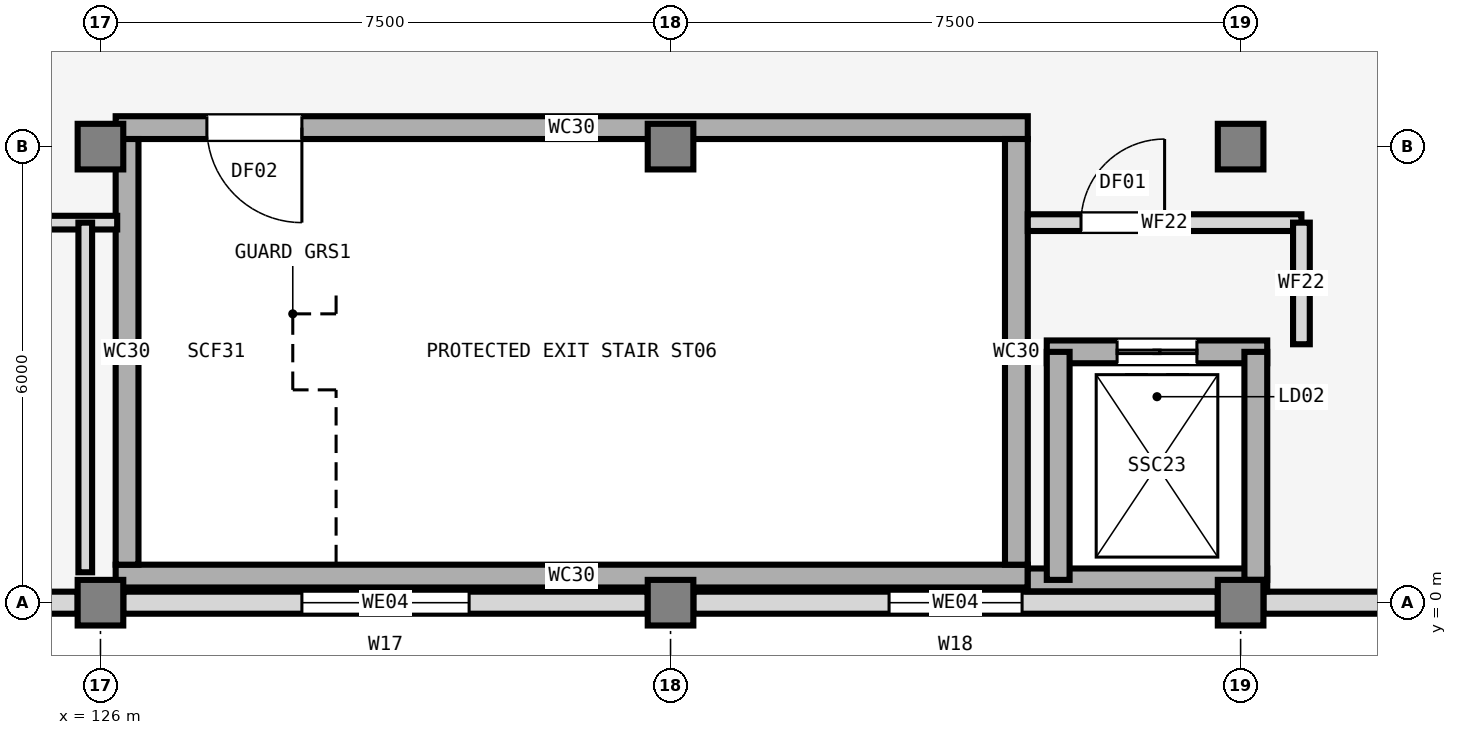
"""IFC4 building model, lengths in metres.
Left out: names, types, materials, properties, quantities, classifications, styles, units other than length and angle.
Written with IfcOpenShell. Run it as: python <this file> out.ifc"""

import sys

from ifc_helpers import new_model, si_unit, direction, frame, frame_2d, origin, origin_2d, place, context, subcontext, project, spatial, rectangle, extrude, element, fill, save


model = new_model("IFC4")
c1 = context("Model", 3, precision=1e-05, world=origin(), true_north=direction((0.0, 1.0)))
c2 = subcontext(c1, "Body", "Model", "MODEL_VIEW")
j1 = project(units=[si_unit("LENGTHUNIT", "METRE"), si_unit("PLANEANGLEUNIT", "RADIAN")], contexts=[c1])
p1 = place(None, origin())
s1 = spatial("IfcSite", under=j1, at=p1, CompositionType="ELEMENT")
p2 = place(p1, origin())
s2 = spatial("IfcBuilding", under=s1, at=p2, CompositionType="ELEMENT")
p3 = place(p2, frame((0.0, 0.0, 4.8)))
s3 = spatial("IfcBuildingStorey", under=s2, at=p3, CompositionType="ELEMENT", Elevation=4.8)
for number, where, z_axis, x_axis in (
    (1, (126.0, 0.0, 0.0), (0.0, 0.0, 1.0), (1.0, 0.0, 0.0)),
    (2, (126.0, 6.0, 0.0), (0.0, 0.0, 1.0), (1.0, 0.0, 0.0)),
    (3, (133.5, 0.0, 0.0), (0.0, 0.0, 1.0), (1.0, 0.0, 0.0)),
    (4, (133.5, 6.0, 0.0), (0.0, 0.0, 1.0), (1.0, 0.0, 0.0)),
    (5, (141.0, 0.0, 0.0), (0.0, 0.0, 1.0), (1.0, 0.0, 0.0)),
    (6, (141.0, 6.0, 0.0), (0.0, 0.0, 1.0), (1.0, 0.0, 0.0)),
):
    element("IfcColumn", number, at=place(p3, frame(where, z_axis=z_axis, x_axis=x_axis)), inside=s3, PredefinedType="COLUMN", context=c2, shape_type="SweptSolid", body=[
        extrude(rectangle(XDim=0.6, YDim=0.6, at=origin_2d()), origin(), (0.0, 0.0, 1.0), 4.5),
    ])
p4 = place(p3, frame((118.8, 0.0, 0.0), z_axis=(0.0, 0.0, 1.0), x_axis=(1.0, 0.0, 0.0)))
e7 = element("IfcWall", 7, at=p4, inside=s3, PredefinedType="SOLIDWALL", context=c2, shape_type="SweptSolid", body=[
    extrude(rectangle(XDim=6.9, YDim=0.29, at=frame_2d((3.45, 0.0))), origin(), (0.0, 0.0, 1.0), 3.7),
])
p5 = place(p4, frame((2.8, 0.0, 2.05)))
e8 = element("IfcOpeningElement", 8, at=p5, cuts=e7, PredefinedType="OPENING", context=c2, shape_type="SweptSolid", body=[
    extrude(rectangle(XDim=1.3, YDim=0.85, at=frame_2d((0.65, 0.425))), frame((0.0, 0.155, 0.0), z_axis=(0.0, -1.0, 0.0), x_axis=(1.0, 0.0, 0.0)), (0.0, 0.0, 1.0), 0.31),
])
p6 = place(p3, frame((126.3, 0.0, 0.0), z_axis=(0.0, 0.0, 1.0), x_axis=(1.0, 0.0, 0.0)))
e9 = element("IfcWall", 9, at=p6, inside=s3, PredefinedType="SOLIDWALL", context=c2, shape_type="SweptSolid", body=[
    extrude(rectangle(XDim=6.9, YDim=0.29, at=frame_2d((3.45, 0.0))), origin(), (0.0, 0.0, 1.0), 3.7),
])
p7 = place(p6, frame((2.35, 0.0, 2.05)))
e10 = element("IfcOpeningElement", 10, at=p7, cuts=e9, PredefinedType="OPENING", context=c2, shape_type="SweptSolid", body=[
    extrude(rectangle(XDim=2.2, YDim=0.95, at=frame_2d((1.1, 0.475))), frame((0.0, 0.155, 0.0), z_axis=(0.0, -1.0, 0.0), x_axis=(1.0, 0.0, 0.0)), (0.0, 0.0, 1.0), 0.31),
])
p8 = place(p3, frame((133.8, 0.0, 0.0), z_axis=(0.0, 0.0, 1.0), x_axis=(1.0, 0.0, 0.0)))
e11 = element("IfcWall", 11, at=p8, inside=s3, PredefinedType="SOLIDWALL", context=c2, shape_type="SweptSolid", body=[
    extrude(rectangle(XDim=6.9, YDim=0.29, at=frame_2d((3.45, 0.0))), origin(), (0.0, 0.0, 1.0), 3.7),
])
p9 = place(p8, frame((2.575, 0.0, 2.05)))
e12 = element("IfcOpeningElement", 12, at=p9, cuts=e11, PredefinedType="OPENING", context=c2, shape_type="SweptSolid", body=[
    extrude(rectangle(XDim=1.75, YDim=0.9, at=frame_2d((0.875, 0.45))), frame((0.0, 0.155, 0.0), z_axis=(0.0, -1.0, 0.0), x_axis=(1.0, 0.0, 0.0)), (0.0, 0.0, 1.0), 0.31),
])
p10 = place(p3, frame((141.3, 0.0, 0.0), z_axis=(0.0, 0.0, 1.0), x_axis=(1.0, 0.0, 0.0)))
e13 = element("IfcWall", 13, at=p10, inside=s3, PredefinedType="SOLIDWALL", context=c2, shape_type="SweptSolid", body=[
    extrude(rectangle(XDim=8.4, YDim=0.29, at=frame_2d((4.2, 0.0))), origin(), (0.0, 0.0, 1.0), 3.7),
])
p11 = place(p10, frame((3.55, 0.0, 2.05)))
e14 = element("IfcOpeningElement", 14, at=p11, cuts=e13, PredefinedType="OPENING", context=c2, shape_type="SweptSolid", body=[
    extrude(rectangle(XDim=1.3, YDim=0.85, at=frame_2d((0.65, 0.425))), frame((0.0, 0.155, 0.0), z_axis=(0.0, -1.0, 0.0), x_axis=(1.0, 0.0, 0.0)), (0.0, 0.0, 1.0), 0.31),
])
p12 = place(p3, frame((138.2, 0.35, 0.0), z_axis=(0.0, 0.0, 1.0), x_axis=(-1.0, 0.0, 0.0)))
e15 = element("IfcWall", 15, at=p12, inside=s3, PredefinedType="SHEAR", context=c2, shape_type="SweptSolid", body=[
    extrude(rectangle(XDim=12.0, YDim=0.3, at=frame_2d((6.0, 0.0))), origin(), (0.0, 0.0, 1.0), 4.5),
])
p13 = place(p3, frame((138.2, 6.25, 0.0), z_axis=(0.0, 0.0, 1.0), x_axis=(-1.0, 0.0, 0.0)))
e16 = element("IfcWall", 16, at=p13, inside=s3, PredefinedType="SHEAR", context=c2, shape_type="SweptSolid", body=[
    extrude(rectangle(XDim=12.0, YDim=0.3, at=frame_2d((6.0, 0.0))), origin(), (0.0, 0.0, 1.0), 4.5),
])
p14 = place(p13, frame((9.55, 0.0, 0.0)))
e17 = element("IfcOpeningElement", 17, at=p14, cuts=e16, PredefinedType="OPENING", context=c2, shape_type="SweptSolid", body=[
    extrude(rectangle(XDim=1.25, YDim=2.15, at=frame_2d((0.625, 1.075))), frame((0.0, 0.16, 0.0), z_axis=(0.0, -1.0, 0.0), x_axis=(1.0, 0.0, 0.0)), (0.0, 0.0, 1.0), 0.32),
])
for number, where, z_axis, x_axis in (
    (18, (126.35, 6.1, 0.0), (0.0, 0.0, 1.0), (0.0, -1.0, 0.0)),
    (19, (138.05, 0.5, 0.0), (0.0, 0.0, 1.0), (0.0, 1.0, 0.0)),
):
    element("IfcWall", number, at=place(p3, frame(where, z_axis=z_axis, x_axis=x_axis)), inside=s3, PredefinedType="SHEAR", context=c2, shape_type="SweptSolid", body=[
        extrude(rectangle(XDim=5.6, YDim=0.3, at=frame_2d((2.8, 0.0))), origin(), (0.0, 0.0, 1.0), 4.5),
    ])
p15 = place(p3, frame((138.2, 0.3, 0.0), z_axis=(0.0, 0.0, 1.0), x_axis=(1.0, 0.0, 0.0)))
e20 = element("IfcWall", 20, at=p15, inside=s3, PredefinedType="SHEAR", context=c2, shape_type="SweptSolid", body=[
    extrude(rectangle(XDim=3.15, YDim=0.3, at=frame_2d((1.575, 0.0))), origin(), (0.0, 0.0, 1.0), 4.5),
])
p16 = place(p3, frame((141.35, 3.3, 0.0), z_axis=(0.0, 0.0, 1.0), x_axis=(-1.0, 0.0, 0.0)))
e21 = element("IfcWall", 21, at=p16, inside=s3, PredefinedType="SHEAR", context=c2, shape_type="SweptSolid", body=[
    extrude(rectangle(XDim=2.9, YDim=0.3, at=frame_2d((1.45, 0.0))), origin(), (0.0, 0.0, 1.0), 4.5),
])
p17 = place(p16, frame((0.925, 0.0, 0.0)))
e22 = element("IfcOpeningElement", 22, at=p17, cuts=e21, PredefinedType="OPENING", context=c2, shape_type="SweptSolid", body=[
    extrude(rectangle(XDim=1.05, YDim=2.15, at=frame_2d((0.525, 1.075))), frame((0.0, 0.16, 0.0), z_axis=(0.0, -1.0, 0.0), x_axis=(1.0, 0.0, 0.0)), (0.0, 0.0, 1.0), 0.32),
])
for number, where, z_axis, x_axis in (
    (23, (138.6, 3.3, 0.0), (0.0, 0.0, 1.0), (0.0, -1.0, 0.0)),
    (24, (141.2, 0.3, 0.0), (0.0, 0.0, 1.0), (0.0, 1.0, 0.0)),
):
    element("IfcWall", number, at=place(p3, frame(where, z_axis=z_axis, x_axis=x_axis)), inside=s3, PredefinedType="SHEAR", context=c2, shape_type="SweptSolid", body=[
        extrude(rectangle(XDim=3.0, YDim=0.3, at=frame_2d((1.5, 0.0))), origin(), (0.0, 0.0, 1.0), 4.5),
    ])
p18 = place(p3, frame((138.2, 5.0, 0.0), z_axis=(0.0, 0.0, 1.0), x_axis=(1.0, 0.0, 0.0)))
e25 = element("IfcWall", 25, at=p18, inside=s3, PredefinedType="SOLIDWALL", context=c2, shape_type="SweptSolid", body=[
    extrude(rectangle(XDim=3.6, YDim=0.22, at=frame_2d((1.8, 0.0))), origin(), (0.0, 0.0, 1.0), 3.4),
])
p19 = place(p18, frame((0.7, 0.0, 0.0)))
e26 = element("IfcOpeningElement", 26, at=p19, cuts=e25, PredefinedType="OPENING", context=c2, shape_type="SweptSolid", body=[
    extrude(rectangle(XDim=1.1, YDim=2.15, at=frame_2d((0.55, 1.075))), frame((0.0, 0.12, 0.0), z_axis=(0.0, -1.0, 0.0), x_axis=(1.0, 0.0, 0.0)), (0.0, 0.0, 1.0), 0.24),
])
p20 = place(p3, frame((141.8, 3.4, 0.0), z_axis=(0.0, 0.0, 1.0), x_axis=(0.0, 1.0, 0.0)))
e27 = element("IfcWall", 27, at=p20, inside=s3, PredefinedType="SOLIDWALL", context=c2, shape_type="SweptSolid", body=[
    extrude(rectangle(XDim=1.6, YDim=0.22, at=frame_2d((0.8, 0.0))), origin(), (0.0, 0.0, 1.0), 3.4),
])
p21 = place(p3, frame((82.07, 5.0, 0.0), z_axis=(0.0, 0.0, 1.0), x_axis=(1.0, 0.0, 0.0)))
e28 = element("IfcWall", 28, at=p21, inside=s3, PredefinedType="PARTITIONING", context=c2, shape_type="SweptSolid", body=[
    extrude(rectangle(XDim=44.15, YDim=0.18, at=frame_2d((22.075, 0.0))), origin(), (0.0, 0.0, 1.0), 3.4),
])
p22 = place(p21, frame((22.625, 0.0, 0.0)))
e29 = element("IfcOpeningElement", 29, at=p22, cuts=e28, PredefinedType="OPENING", context=c2, shape_type="SweptSolid", body=[
    extrude(rectangle(XDim=1.1, YDim=2.1, at=frame_2d((0.55, 1.05))), frame((0.0, 0.1, 0.0), z_axis=(0.0, -1.0, 0.0), x_axis=(1.0, 0.0, 0.0)), (0.0, 0.0, 1.0), 0.2),
])
p23 = place(p3, frame((125.8, 5.0, 0.0), z_axis=(0.0, 0.0, 1.0), x_axis=(0.0, -1.0, 0.0)))
e30 = element("IfcWall", 30, at=p23, inside=s3, PredefinedType="PARTITIONING", context=c2, shape_type="SweptSolid", body=[
    extrude(rectangle(XDim=4.6, YDim=0.18, at=frame_2d((2.3, 0.0))), origin(), (0.0, 0.0, 1.0), 3.4),
])
p24 = place(p7, origin())
e31 = element("IfcWindow", 31, at=p24, inside=s3, PartitioningType="SINGLE_PANEL", PredefinedType="WINDOW", context=c2, shape_type="SweptSolid", body=[
    extrude(rectangle(XDim=2.2, YDim=0.95, at=frame_2d((1.1, 0.475))), frame((0.0, 0.03, 0.0), z_axis=(0.0, -1.0, 0.0), x_axis=(1.0, 0.0, 0.0)), (0.0, 0.0, 1.0), 0.06),
])
fill(e10, e31)
p25 = place(p9, origin())
e32 = element("IfcWindow", 32, at=p25, inside=s3, PartitioningType="SINGLE_PANEL", PredefinedType="WINDOW", context=c2, shape_type="SweptSolid", body=[
    extrude(rectangle(XDim=1.75, YDim=0.9, at=frame_2d((0.875, 0.45))), frame((0.0, 0.03, 0.0), z_axis=(0.0, -1.0, 0.0), x_axis=(1.0, 0.0, 0.0)), (0.0, 0.0, 1.0), 0.06),
])
fill(e12, e32)
p26 = place(p14, origin())
e33 = element("IfcDoor", 33, at=p26, inside=s3, OperationType="SINGLE_SWING_LEFT", PredefinedType="DOOR", context=c2, shape_type="SweptSolid", body=[
    extrude(rectangle(XDim=1.25, YDim=2.15, at=frame_2d((0.625, 1.075))), frame((0.0, 0.025, 0.0), z_axis=(0.0, -1.0, 0.0), x_axis=(1.0, 0.0, 0.0)), (0.0, 0.0, 1.0), 0.05),
])
fill(e17, e33)
p27 = place(p17, origin())
e34 = element("IfcDoor", 34, at=p27, inside=s3, OperationType="DOUBLE_DOOR_SLIDING", PredefinedType="DOOR", context=c2, shape_type="SweptSolid", body=[
    extrude(rectangle(XDim=1.05, YDim=2.15, at=frame_2d((0.525, 1.075))), frame((0.0, 0.025, 0.0), z_axis=(0.0, -1.0, 0.0), x_axis=(1.0, 0.0, 0.0)), (0.0, 0.0, 1.0), 0.05),
])
fill(e22, e34)
p28 = place(p19, origin())
e35 = element("IfcDoor", 35, at=p28, inside=s3, OperationType="SINGLE_SWING_RIGHT", PredefinedType="DOOR", context=c2, shape_type="SweptSolid", body=[
    extrude(rectangle(XDim=1.1, YDim=2.15, at=frame_2d((0.55, 1.075))), frame((0.0, 0.025, 0.0), z_axis=(0.0, -1.0, 0.0), x_axis=(1.0, 0.0, 0.0)), (0.0, 0.0, 1.0), 0.05),
])
fill(e26, e35)
save(model, sys.argv[1])
